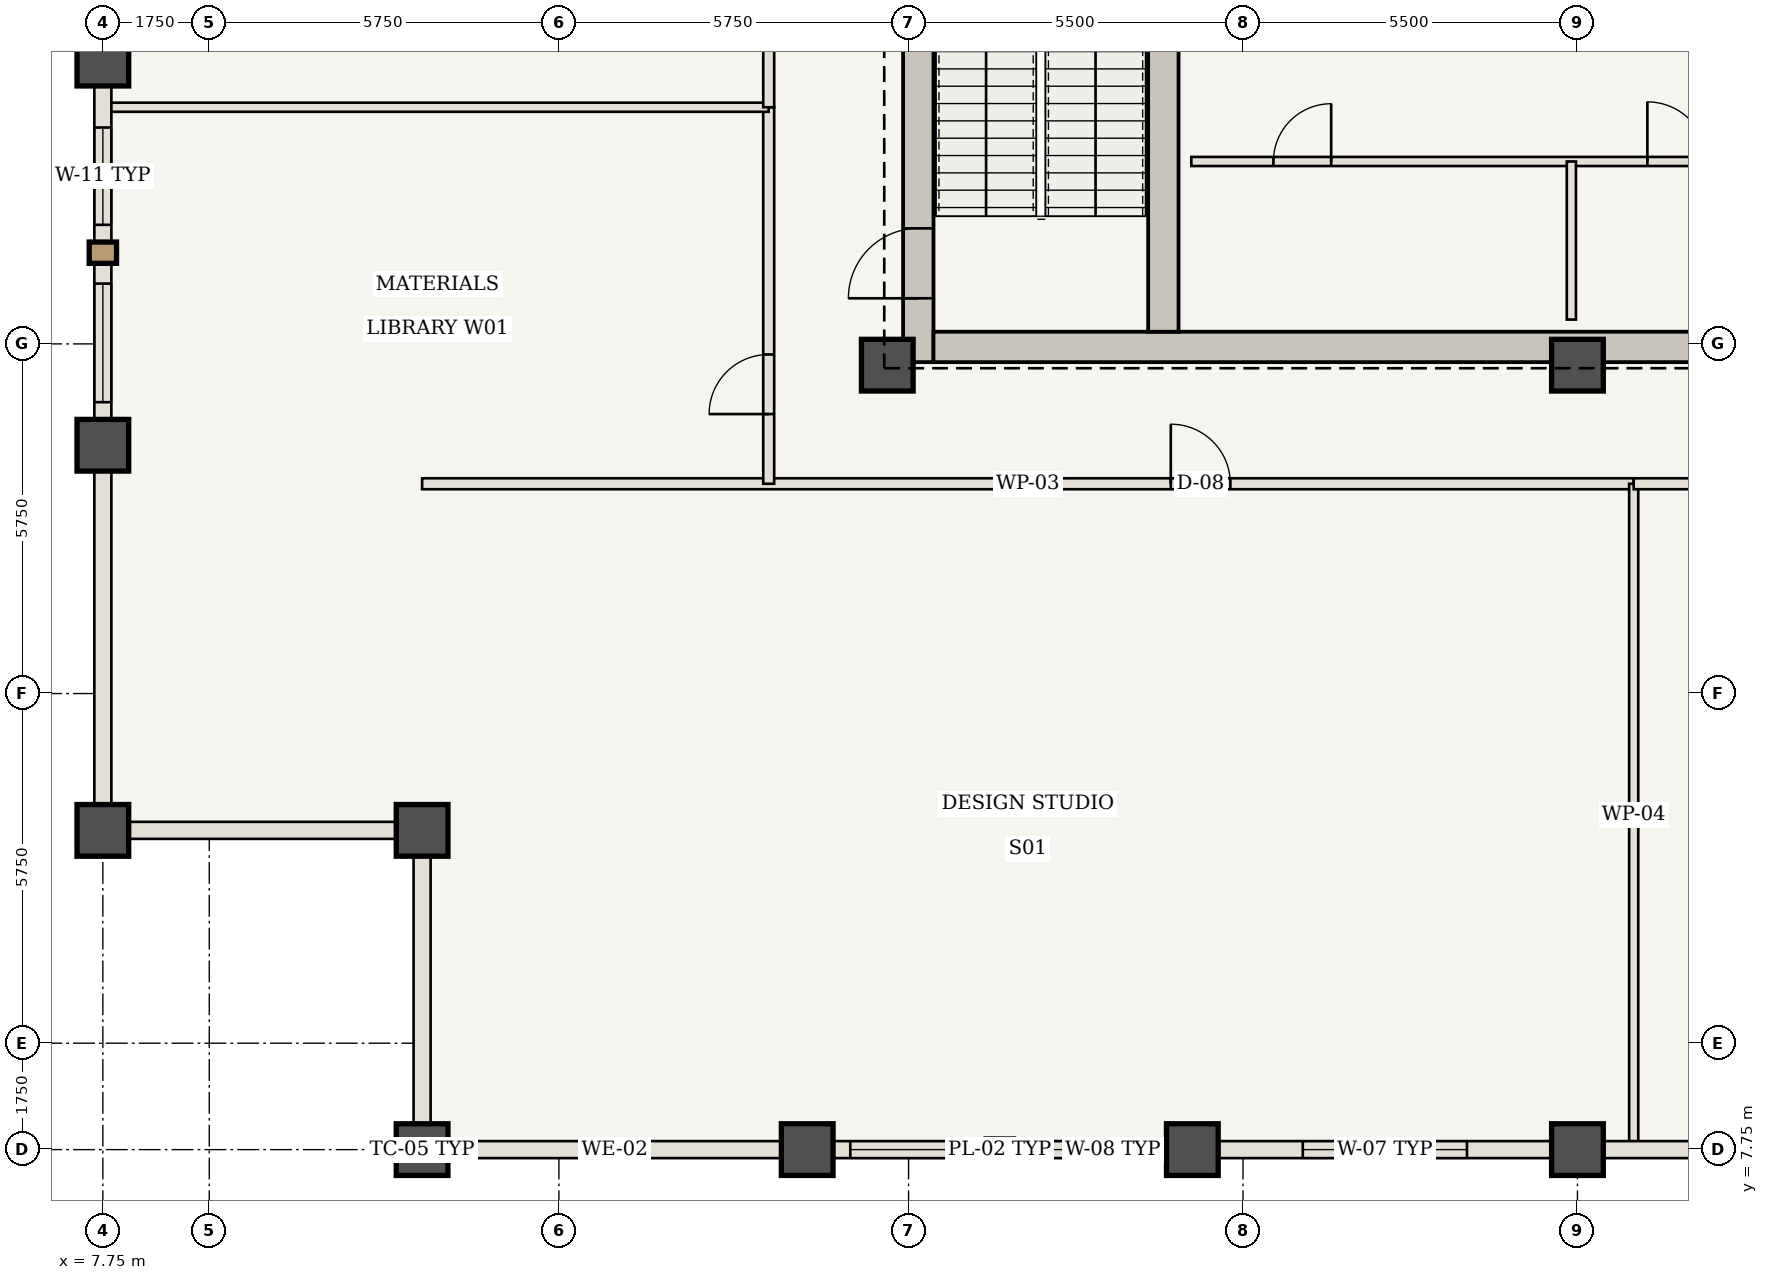
"""IFC4 building model, lengths in metres.
Left out: names, types, materials, properties, quantities, classifications, styles, units other than length and angle.
Written with IfcOpenShell. Run it as: python <this file> out.ifc"""

import sys

from ifc_helpers import new_model, si_unit, direction, frame, frame_2d, origin, origin_2d, place, context, subcontext, project, spatial, rectangle, extrude, element, fill, save


model = new_model("IFC4")
c1 = context("Model", 3, precision=1e-05, world=origin(), true_north=direction((0.0, 1.0)))
c2 = subcontext(c1, "Body", "Model", "MODEL_VIEW")
j1 = project(units=[si_unit("LENGTHUNIT", "METRE"), si_unit("PLANEANGLEUNIT", "RADIAN")], contexts=[c1])
p1 = place(None, origin())
s1 = spatial("IfcSite", under=j1, at=p1, CompositionType="ELEMENT")
p2 = place(p1, origin())
s2 = spatial("IfcBuilding", under=s1, at=p2, CompositionType="ELEMENT")
p3 = place(p2, frame((0.0, 0.0, 217.7)))
s3 = spatial("IfcBuildingStorey", under=s2, at=p3, CompositionType="ELEMENT", Elevation=217.7)
p4 = place(p3, frame((21.16, 20.7, 0.0), z_axis=(0.0, 0.0, 1.0), x_axis=(0.0, 1.0, 0.0)))
e1 = element("IfcWall", 1, at=p4, inside=s3, PredefinedType="SHEAR", context=c2, shape_type="SweptSolid", body=[
    extrude(rectangle(XDim=9.9, YDim=0.5, at=frame_2d((4.95, 0.0))), origin(), (0.0, 0.0, 1.0), 3.85),
])
p5 = place(p4, frame((1.05, 0.0, 0.0)))
e2 = element("IfcOpeningElement", 2, at=p5, cuts=e1, PredefinedType="OPENING", context=c2, shape_type="SweptSolid", body=[
    extrude(rectangle(XDim=1.15, YDim=2.15, at=frame_2d((0.575, 1.075))), frame((0.0, 0.26, 0.0), z_axis=(0.0, -1.0, 0.0), x_axis=(1.0, 0.0, 0.0)), (0.0, 0.0, 1.0), 0.52),
])
p6 = place(p3, frame((21.41, 20.95, 0.0), z_axis=(0.0, 0.0, 1.0), x_axis=(1.0, 0.0, 0.0)))
e3 = element("IfcWall", 3, at=p6, inside=s3, PredefinedType="SHEAR", context=c2, shape_type="SweptSolid", body=[
    extrude(rectangle(XDim=13.74, YDim=0.5, at=frame_2d((6.87, 0.0))), origin(), (0.0, 0.0, 1.0), 3.85),
])
p7 = place(p3, frame((25.19, 21.2, 0.0), z_axis=(0.0, 0.0, 1.0), x_axis=(0.0, 1.0, 0.0)))
e4 = element("IfcWall", 4, at=p7, inside=s3, PredefinedType="SHEAR", context=c2, shape_type="SweptSolid", body=[
    extrude(rectangle(XDim=9.4, YDim=0.5, at=frame_2d((4.7, 0.0))), origin(), (0.0, 0.0, 1.0), 3.85),
])
for number, where, z_axis, x_axis in (
    (5, (20.65, 20.65, 0.0), (0.0, 0.0, 1.0), (1.0, 0.0, 0.0)),
    (6, (32.0, 20.65, 0.0), (0.0, 0.0, 1.0), (1.0, 0.0, 0.0)),
    (7, (13.0, 7.75, 0.0), (0.0, 0.0, 1.0), (1.0, 0.0, 0.0)),
    (8, (13.0, 13.0, 0.0), (0.0, 0.0, 1.0), (1.0, 0.0, 0.0)),
    (9, (7.75, 13.0, 0.0), (0.0, 0.0, 1.0), (1.0, 0.0, 0.0)),
    (10, (19.333, 7.75, 0.0), (0.0, 0.0, 1.0), (1.0, 0.0, 0.0)),
    (11, (7.75, 19.333, 0.0), (0.0, 0.0, 1.0), (1.0, 0.0, 0.0)),
    (12, (25.667, 7.75, 0.0), (0.0, 0.0, 1.0), (1.0, 0.0, 0.0)),
    (13, (7.75, 25.667, 0.0), (0.0, 0.0, 1.0), (1.0, 0.0, 0.0)),
    (14, (32.0, 7.75, 0.0), (0.0, 0.0, 1.0), (1.0, 0.0, 0.0)),
):
    element("IfcColumn", number, at=place(p3, frame(where, z_axis=z_axis, x_axis=x_axis)), inside=s3, PredefinedType="COLUMN", context=c2, shape_type="SweptSolid", body=[
        extrude(rectangle(XDim=0.85, YDim=0.85, at=origin_2d()), origin(), (0.0, 0.0, 1.0), 3.85),
    ])
p8 = place(p3, frame((25.65, 24.0, 0.0), z_axis=(0.0, 0.0, 1.0), x_axis=(1.0, 0.0, 0.0)))
e15 = element("IfcWall", 15, at=p8, inside=s3, PredefinedType="STANDARD", context=c2, shape_type="SweptSolid", body=[
    extrude(rectangle(XDim=9.35, YDim=0.15, at=frame_2d((4.675, 0.0))), origin(), (0.0, 0.0, 1.0), 3.685),
])
p9 = place(p8, frame((1.35, 0.0, 0.0)))
e16 = element("IfcOpeningElement", 16, at=p9, cuts=e15, PredefinedType="OPENING", context=c2, shape_type="SweptSolid", body=[
    extrude(rectangle(XDim=0.95, YDim=2.15, at=frame_2d((0.475, 1.075))), frame((0.0, 0.085, 0.0), z_axis=(0.0, -1.0, 0.0), x_axis=(1.0, 0.0, 0.0)), (0.0, 0.0, 1.0), 0.17),
])
p10 = place(p8, frame((7.5, 0.0, 0.0)))
e17 = element("IfcOpeningElement", 17, at=p10, cuts=e15, PredefinedType="OPENING", context=c2, shape_type="SweptSolid", body=[
    extrude(rectangle(XDim=0.98, YDim=2.2, at=frame_2d((0.49, 1.1))), frame((0.0, 0.085, 0.0), z_axis=(0.0, -1.0, 0.0), x_axis=(1.0, 0.0, 0.0)), (0.0, 0.0, 1.0), 0.17),
])
p11 = place(p3, frame((31.9, 21.4, 0.0), z_axis=(0.0, 0.0, 1.0), x_axis=(0.0, 1.0, 0.0)))
e18 = element("IfcWall", 18, at=p11, inside=s3, PredefinedType="STANDARD", context=c2, shape_type="SweptSolid", body=[
    extrude(rectangle(XDim=2.6, YDim=0.15, at=frame_2d((1.3, 0.0))), origin(), (0.0, 0.0, 1.0), 3.685),
])
p12 = place(p3, frame((13.0, 18.7, 0.0), z_axis=(0.0, 0.0, 1.0), x_axis=(1.0, 0.0, 0.0)))
e19 = element("IfcWall", 19, at=p12, inside=s3, PredefinedType="STANDARD", context=c2, shape_type="SweptSolid", body=[
    extrude(rectangle(XDim=19.925, YDim=0.18, at=frame_2d((9.962, 0.0))), origin(), (0.0, 0.0, 1.0), 3.685),
])
p13 = place(p12, frame((12.312, 0.0, 0.0)))
e20 = element("IfcOpeningElement", 20, at=p13, cuts=e19, PredefinedType="OPENING", context=c2, shape_type="SweptSolid", body=[
    extrude(rectangle(XDim=0.98, YDim=2.2, at=frame_2d((0.49, 1.1))), frame((0.0, 0.1, 0.0), z_axis=(0.0, -1.0, 0.0), x_axis=(1.0, 0.0, 0.0)), (0.0, 0.0, 1.0), 0.2),
])
p14 = place(p3, frame((32.925, 7.81, 0.0), z_axis=(0.0, 0.0, 1.0), x_axis=(0.0, 1.0, 0.0)))
e21 = element("IfcWall", 21, at=p14, inside=s3, PredefinedType="STANDARD", context=c2, shape_type="SweptSolid", body=[
    extrude(rectangle(XDim=10.89, YDim=0.15, at=frame_2d((5.445, 0.0))), origin(), (0.0, 0.0, 1.0), 3.685),
])
p15 = place(p3, frame((32.925, 18.7, 0.0), z_axis=(0.0, 0.0, 1.0), x_axis=(1.0, 0.0, 0.0)))
e22 = element("IfcWall", 22, at=p15, inside=s3, PredefinedType="STANDARD", context=c2, shape_type="SweptSolid", body=[
    extrude(rectangle(XDim=18.075, YDim=0.18, at=frame_2d((9.038, 0.0))), origin(), (0.0, 0.0, 1.0), 3.685),
])
p16 = place(p15, frame((5.812, 0.0, 0.0)))
e23 = element("IfcOpeningElement", 23, at=p16, cuts=e22, PredefinedType="OPENING", context=c2, shape_type="SweptSolid", body=[
    extrude(rectangle(XDim=0.98, YDim=2.2, at=frame_2d((0.49, 1.1))), frame((0.0, 0.1, 0.0), z_axis=(0.0, -1.0, 0.0), x_axis=(1.0, 0.0, 0.0)), (0.0, 0.0, 1.0), 0.2),
])
p17 = place(p3, frame((18.7, 18.7, 0.0), z_axis=(0.0, 0.0, 1.0), x_axis=(0.0, 1.0, 0.0)))
e24 = element("IfcWall", 24, at=p17, inside=s3, PredefinedType="STANDARD", context=c2, shape_type="SweptSolid", body=[
    extrude(rectangle(XDim=6.192, YDim=0.18, at=frame_2d((3.096, 0.0))), origin(), (0.0, 0.0, 1.0), 3.685),
])
p18 = place(p17, frame((1.146, 0.0, 0.0)))
e25 = element("IfcOpeningElement", 25, at=p18, cuts=e24, PredefinedType="OPENING", context=c2, shape_type="SweptSolid", body=[
    extrude(rectangle(XDim=0.98, YDim=2.2, at=frame_2d((0.49, 1.1))), frame((0.0, 0.1, 0.0), z_axis=(0.0, -1.0, 0.0), x_axis=(1.0, 0.0, 0.0)), (0.0, 0.0, 1.0), 0.2),
])
p19 = place(p3, frame((7.81, 24.892, 0.0), z_axis=(0.0, 0.0, 1.0), x_axis=(1.0, 0.0, 0.0)))
e26 = element("IfcWall", 26, at=p19, inside=s3, PredefinedType="STANDARD", context=c2, shape_type="SweptSolid", body=[
    extrude(rectangle(XDim=10.89, YDim=0.15, at=frame_2d((5.445, 0.0))), origin(), (0.0, 0.0, 1.0), 3.685),
])
p20 = place(p3, frame((18.7, 24.892, 0.0), z_axis=(0.0, 0.0, 1.0), x_axis=(0.0, 1.0, 0.0)))
e27 = element("IfcWall", 27, at=p20, inside=s3, PredefinedType="STANDARD", context=c2, shape_type="SweptSolid", body=[
    extrude(rectangle(XDim=14.367, YDim=0.18, at=frame_2d((7.183, 0.0))), origin(), (0.0, 0.0, 1.0), 3.685),
])
p21 = place(p20, frame((8.133, 0.0, 0.0)))
e28 = element("IfcOpeningElement", 28, at=p21, cuts=e27, PredefinedType="OPENING", context=c2, shape_type="SweptSolid", body=[
    extrude(rectangle(XDim=0.98, YDim=2.2, at=frame_2d((0.49, 1.1))), frame((0.0, 0.1, 0.0), z_axis=(0.0, -1.0, 0.0), x_axis=(1.0, 0.0, 0.0)), (0.0, 0.0, 1.0), 0.2),
])
p22 = place(p3, frame((19.333, 7.75, 0.0), z_axis=(0.0, 0.0, 1.0), x_axis=(-1.0, 0.0, 0.0)))
e29 = element("IfcWall", 29, at=p22, inside=s3, PredefinedType="USERDEFINED", context=c2, shape_type="SweptSolid", body=[
    extrude(rectangle(XDim=6.333, YDim=0.28, at=frame_2d((3.167, 0.0))), origin(), (0.0, 0.0, 1.0), 2.985),
])
p23 = place(p3, frame((25.667, 7.75, 0.0), z_axis=(0.0, 0.0, 1.0), x_axis=(-1.0, 0.0, 0.0)))
e30 = element("IfcWall", 30, at=p23, inside=s3, PredefinedType="USERDEFINED", context=c2, shape_type="SweptSolid", body=[
    extrude(rectangle(XDim=6.333, YDim=0.28, at=frame_2d((3.167, 0.0))), origin(), (0.0, 0.0, 1.0), 2.985),
])
p24 = place(p23, frame((0.708, 0.0, 0.85)))
e31 = element("IfcOpeningElement", 31, at=p24, cuts=e30, PredefinedType="OPENING", context=c2, shape_type="SweptSolid", body=[
    extrude(rectangle(XDim=1.95, YDim=1.935, at=frame_2d((0.975, 0.968))), frame((0.0, 0.15, 0.0), z_axis=(0.0, -1.0, 0.0), x_axis=(1.0, 0.0, 0.0)), (0.0, 0.0, 1.0), 0.3),
])
p25 = place(p23, frame((3.675, 0.0, 0.85)))
e32 = element("IfcOpeningElement", 32, at=p25, cuts=e30, PredefinedType="OPENING", context=c2, shape_type="SweptSolid", body=[
    extrude(rectangle(XDim=1.95, YDim=1.935, at=frame_2d((0.975, 0.968))), frame((0.0, 0.15, 0.0), z_axis=(0.0, -1.0, 0.0), x_axis=(1.0, 0.0, 0.0)), (0.0, 0.0, 1.0), 0.3),
])
p26 = place(p3, frame((32.0, 7.75, 0.0), z_axis=(0.0, 0.0, 1.0), x_axis=(-1.0, 0.0, 0.0)))
e33 = element("IfcWall", 33, at=p26, inside=s3, PredefinedType="USERDEFINED", context=c2, shape_type="SweptSolid", body=[
    extrude(rectangle(XDim=6.333, YDim=0.28, at=frame_2d((3.167, 0.0))), origin(), (0.0, 0.0, 1.0), 2.985),
])
p27 = place(p26, frame((1.817, 0.0, 0.85)))
e34 = element("IfcOpeningElement", 34, at=p27, cuts=e33, PredefinedType="OPENING", context=c2, shape_type="SweptSolid", body=[
    extrude(rectangle(XDim=2.7, YDim=1.935, at=frame_2d((1.35, 0.968))), frame((0.0, 0.15, 0.0), z_axis=(0.0, -1.0, 0.0), x_axis=(1.0, 0.0, 0.0)), (0.0, 0.0, 1.0), 0.3),
])
p28 = place(p3, frame((38.333, 7.75, 0.0), z_axis=(0.0, 0.0, 1.0), x_axis=(-1.0, 0.0, 0.0)))
e35 = element("IfcWall", 35, at=p28, inside=s3, PredefinedType="USERDEFINED", context=c2, shape_type="SweptSolid", body=[
    extrude(rectangle(XDim=6.333, YDim=0.28, at=frame_2d((3.167, 0.0))), origin(), (0.0, 0.0, 1.0), 2.985),
])
p29 = place(p28, frame((1.517, 0.0, 0.85)))
e36 = element("IfcOpeningElement", 36, at=p29, cuts=e35, PredefinedType="OPENING", context=c2, shape_type="SweptSolid", body=[
    extrude(rectangle(XDim=2.7, YDim=1.935, at=frame_2d((1.35, 0.968))), frame((0.0, 0.15, 0.0), z_axis=(0.0, -1.0, 0.0), x_axis=(1.0, 0.0, 0.0)), (0.0, 0.0, 1.0), 0.3),
])
p30 = place(p3, frame((7.75, 13.0, 0.0), z_axis=(0.0, 0.0, 1.0), x_axis=(0.0, 1.0, 0.0)))
e37 = element("IfcWall", 37, at=p30, inside=s3, PredefinedType="USERDEFINED", context=c2, shape_type="SweptSolid", body=[
    extrude(rectangle(XDim=6.333, YDim=0.28, at=frame_2d((3.167, 0.0))), origin(), (0.0, 0.0, 1.0), 2.985),
])
p31 = place(p3, frame((7.75, 19.333, 0.0), z_axis=(0.0, 0.0, 1.0), x_axis=(0.0, 1.0, 0.0)))
e38 = element("IfcWall", 38, at=p31, inside=s3, PredefinedType="USERDEFINED", context=c2, shape_type="SweptSolid", body=[
    extrude(rectangle(XDim=6.333, YDim=0.28, at=frame_2d((3.167, 0.0))), origin(), (0.0, 0.0, 1.0), 2.985),
])
p32 = place(p31, frame((0.708, 0.0, 0.85)))
e39 = element("IfcOpeningElement", 39, at=p32, cuts=e38, PredefinedType="OPENING", context=c2, shape_type="SweptSolid", body=[
    extrude(rectangle(XDim=1.95, YDim=1.935, at=frame_2d((0.975, 0.968))), frame((0.0, 0.15, 0.0), z_axis=(0.0, -1.0, 0.0), x_axis=(1.0, 0.0, 0.0)), (0.0, 0.0, 1.0), 0.3),
])
p33 = place(p31, frame((3.625, 0.0, 0.85)))
e40 = element("IfcOpeningElement", 40, at=p33, cuts=e38, PredefinedType="OPENING", context=c2, shape_type="SweptSolid", body=[
    extrude(rectangle(XDim=1.6, YDim=1.935, at=frame_2d((0.8, 0.968))), frame((0.0, 0.15, 0.0), z_axis=(0.0, -1.0, 0.0), x_axis=(1.0, 0.0, 0.0)), (0.0, 0.0, 1.0), 0.3),
])
p34 = place(p3, frame((7.75, 25.667, 0.0), z_axis=(0.0, 0.0, 1.0), x_axis=(0.0, 1.0, 0.0)))
e41 = element("IfcWall", 41, at=p34, inside=s3, PredefinedType="USERDEFINED", context=c2, shape_type="SweptSolid", body=[
    extrude(rectangle(XDim=6.333, YDim=0.28, at=frame_2d((3.167, 0.0))), origin(), (0.0, 0.0, 1.0), 2.985),
])
p35 = place(p34, frame((1.817, 0.0, 0.85)))
e42 = element("IfcOpeningElement", 42, at=p35, cuts=e41, PredefinedType="OPENING", context=c2, shape_type="SweptSolid", body=[
    extrude(rectangle(XDim=2.7, YDim=1.935, at=frame_2d((1.35, 0.968))), frame((0.0, 0.15, 0.0), z_axis=(0.0, -1.0, 0.0), x_axis=(1.0, 0.0, 0.0)), (0.0, 0.0, 1.0), 0.3),
])
for number, where, z_axis, x_axis in (
    (43, (13.0, 7.75, 0.0), (0.0, 0.0, 1.0), (0.0, 1.0, 0.0)),
    (44, (13.0, 13.0, 0.0), (0.0, 0.0, 1.0), (-1.0, 0.0, 0.0)),
):
    element("IfcWall", number, at=place(p3, frame(where, z_axis=z_axis, x_axis=x_axis)), inside=s3, PredefinedType="USERDEFINED", context=c2, shape_type="SweptSolid", body=[
        extrude(rectangle(XDim=5.25, YDim=0.28, at=frame_2d((2.625, 0.0))), origin(), (0.0, 0.0, 1.0), 2.985),
    ])
p36 = place(p5, origin())
e45 = element("IfcDoor", 45, at=p36, inside=s3, OperationType="SINGLE_SWING_LEFT", PredefinedType="DOOR", context=c2, shape_type="SweptSolid", body=[
    extrude(rectangle(XDim=1.15, YDim=2.15, at=frame_2d((0.575, 1.075))), frame((0.0, 0.025, 0.0), z_axis=(0.0, -1.0, 0.0), x_axis=(1.0, 0.0, 0.0)), (0.0, 0.0, 1.0), 0.05),
])
fill(e2, e45)
p37 = place(p9, origin())
e46 = element("IfcDoor", 46, at=p37, inside=s3, OperationType="SINGLE_SWING_RIGHT", PredefinedType="DOOR", context=c2, shape_type="SweptSolid", body=[
    extrude(rectangle(XDim=0.95, YDim=2.15, at=frame_2d((0.475, 1.075))), frame((0.0, 0.025, 0.0), z_axis=(0.0, -1.0, 0.0), x_axis=(1.0, 0.0, 0.0)), (0.0, 0.0, 1.0), 0.05),
])
fill(e16, e46)
p38 = place(p10, origin())
e47 = element("IfcDoor", 47, at=p38, inside=s3, OperationType="SINGLE_SWING_LEFT", PredefinedType="DOOR", context=c2, shape_type="SweptSolid", body=[
    extrude(rectangle(XDim=0.98, YDim=2.2, at=frame_2d((0.49, 1.1))), frame((0.0, 0.025, 0.0), z_axis=(0.0, -1.0, 0.0), x_axis=(1.0, 0.0, 0.0)), (0.0, 0.0, 1.0), 0.05),
])
fill(e17, e47)
p39 = place(p13, origin())
e48 = element("IfcDoor", 48, at=p39, inside=s3, OperationType="SINGLE_SWING_LEFT", PredefinedType="DOOR", context=c2, shape_type="SweptSolid", body=[
    extrude(rectangle(XDim=0.98, YDim=2.2, at=frame_2d((0.49, 1.1))), frame((0.0, 0.025, 0.0), z_axis=(0.0, -1.0, 0.0), x_axis=(1.0, 0.0, 0.0)), (0.0, 0.0, 1.0), 0.05),
])
fill(e20, e48)
p40 = place(p18, origin())
e49 = element("IfcDoor", 49, at=p40, inside=s3, OperationType="SINGLE_SWING_LEFT", PredefinedType="DOOR", context=c2, shape_type="SweptSolid", body=[
    extrude(rectangle(XDim=0.98, YDim=2.2, at=frame_2d((0.49, 1.1))), frame((0.0, 0.025, 0.0), z_axis=(0.0, -1.0, 0.0), x_axis=(1.0, 0.0, 0.0)), (0.0, 0.0, 1.0), 0.05),
])
fill(e25, e49)
p41 = place(p24, origin())
e50 = element("IfcWindow", 50, at=p41, inside=s3, PartitioningType="SINGLE_PANEL", PredefinedType="WINDOW", context=c2, shape_type="SweptSolid", body=[
    extrude(rectangle(XDim=1.95, YDim=1.935, at=frame_2d((0.975, 0.968))), frame((0.0, 0.03, 0.0), z_axis=(0.0, -1.0, 0.0), x_axis=(1.0, 0.0, 0.0)), (0.0, 0.0, 1.0), 0.06),
])
fill(e31, e50)
p42 = place(p25, origin())
e51 = element("IfcWindow", 51, at=p42, inside=s3, PartitioningType="SINGLE_PANEL", PredefinedType="WINDOW", context=c2, shape_type="SweptSolid", body=[
    extrude(rectangle(XDim=1.95, YDim=1.935, at=frame_2d((0.975, 0.968))), frame((0.0, 0.03, 0.0), z_axis=(0.0, -1.0, 0.0), x_axis=(1.0, 0.0, 0.0)), (0.0, 0.0, 1.0), 0.06),
])
fill(e32, e51)
p43 = place(p27, origin())
e52 = element("IfcWindow", 52, at=p43, inside=s3, PartitioningType="SINGLE_PANEL", PredefinedType="WINDOW", context=c2, shape_type="SweptSolid", body=[
    extrude(rectangle(XDim=2.7, YDim=1.935, at=frame_2d((1.35, 0.968))), frame((0.0, 0.03, 0.0), z_axis=(0.0, -1.0, 0.0), x_axis=(1.0, 0.0, 0.0)), (0.0, 0.0, 1.0), 0.06),
])
fill(e34, e52)
p44 = place(p32, origin())
e53 = element("IfcWindow", 53, at=p44, inside=s3, PartitioningType="SINGLE_PANEL", PredefinedType="WINDOW", context=c2, shape_type="SweptSolid", body=[
    extrude(rectangle(XDim=1.95, YDim=1.935, at=frame_2d((0.975, 0.968))), frame((0.0, 0.03, 0.0), z_axis=(0.0, -1.0, 0.0), x_axis=(1.0, 0.0, 0.0)), (0.0, 0.0, 1.0), 0.06),
])
fill(e39, e53)
p45 = place(p33, origin())
e54 = element("IfcWindow", 54, at=p45, inside=s3, PartitioningType="SINGLE_PANEL", PredefinedType="WINDOW", context=c2, shape_type="SweptSolid", body=[
    extrude(rectangle(XDim=1.6, YDim=1.935, at=frame_2d((0.8, 0.968))), frame((0.0, 0.03, 0.0), z_axis=(0.0, -1.0, 0.0), x_axis=(1.0, 0.0, 0.0)), (0.0, 0.0, 1.0), 0.06),
])
fill(e40, e54)
save(model, sys.argv[1])
